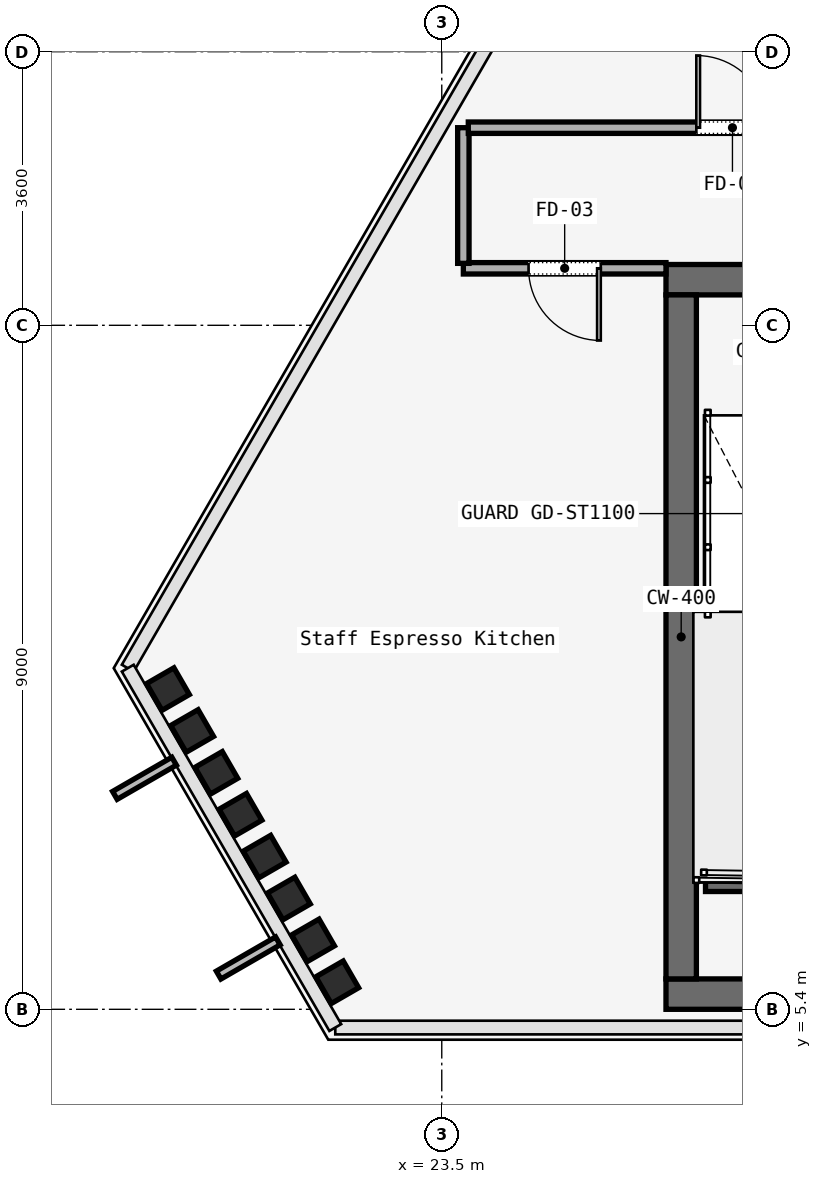
"""IFC4 building model, lengths in metres.
Left out: names, types, materials, properties, quantities, classifications, styles, units other than length and angle.
Written with IfcOpenShell. Run it as: python <this file> out.ifc"""

import sys

from ifc_helpers import new_model, si_unit, direction, frame, frame_2d, origin, origin_2d, place, context, subcontext, project, spatial, rectangle, i_section, extrude, element, fill, save


model = new_model("IFC4")
c1 = context("Model", 3, precision=1e-05, world=origin(), true_north=direction((0.0, 1.0)))
c2 = subcontext(c1, "Body", "Model", "MODEL_VIEW")
j1 = project(units=[si_unit("LENGTHUNIT", "METRE"), si_unit("PLANEANGLEUNIT", "RADIAN")], contexts=[c1])
p1 = place(None, origin())
s1 = spatial("IfcSite", under=j1, at=p1, CompositionType="ELEMENT")
p2 = place(p1, origin())
s2 = spatial("IfcBuilding", under=s1, at=p2, CompositionType="ELEMENT")
p3 = place(p2, frame((0.0, 0.0, 267.4)))
s3 = spatial("IfcBuildingStorey", under=s2, at=p3, CompositionType="ELEMENT", Elevation=267.4)
p4 = place(p3, frame((26.45, 15.0, 0.0), z_axis=(0.0, 0.0, 1.0), x_axis=(1.0, 0.0, 0.0)))
e1 = element("IfcWall", 1, at=p4, inside=s3, PredefinedType="SOLIDWALL", context=c2, shape_type="SweptSolid", body=[
    extrude(rectangle(XDim=31.1, YDim=0.4, at=frame_2d((15.55, 0.0))), origin(), (0.0, 0.0, 1.0), 3.58),
])
p5 = place(p4, frame((1.65, 0.0, 0.0)))
e2 = element("IfcOpeningElement", 2, at=p5, cuts=e1, PredefinedType="OPENING", context=c2, shape_type="SweptSolid", body=[
    extrude(rectangle(XDim=1.1, YDim=2.2, at=frame_2d((0.55, 1.1))), frame((0.0, 0.2, 0.0), z_axis=(0.0, -1.0, 0.0), x_axis=(1.0, 0.0, 0.0)), (0.0, 0.0, 1.0), 0.4),
])
p6 = place(p4, frame((13.65, 0.0, 0.0)))
e3 = element("IfcOpeningElement", 3, at=p6, cuts=e1, PredefinedType="OPENING", context=c2, shape_type="SweptSolid", body=[
    extrude(rectangle(XDim=1.1, YDim=2.2, at=frame_2d((0.55, 1.1))), frame((0.0, 0.2, 0.0), z_axis=(0.0, -1.0, 0.0), x_axis=(1.0, 0.0, 0.0)), (0.0, 0.0, 1.0), 0.4),
])
p7 = place(p4, frame((25.55, 0.0, 0.0)))
e4 = element("IfcOpeningElement", 4, at=p7, cuts=e1, PredefinedType="OPENING", context=c2, shape_type="SweptSolid", body=[
    extrude(rectangle(XDim=1.1, YDim=2.2, at=frame_2d((0.55, 1.1))), frame((0.0, 0.2, 0.0), z_axis=(0.0, -1.0, 0.0), x_axis=(1.0, 0.0, 0.0)), (0.0, 0.0, 1.0), 0.4),
])
p8 = place(p4, frame((19.35, 0.0, 0.0)))
e5 = element("IfcOpeningElement", 5, at=p8, cuts=e1, PredefinedType="OPENING", context=c2, shape_type="SweptSolid", body=[
    extrude(rectangle(XDim=1.1, YDim=2.2, at=frame_2d((0.55, 1.1))), frame((0.0, 0.2, 0.0), z_axis=(0.0, -1.0, 0.0), x_axis=(1.0, 0.0, 0.0)), (0.0, 0.0, 1.0), 0.4),
])
p9 = place(p4, frame((21.4, 0.0, 0.0)))
e6 = element("IfcOpeningElement", 6, at=p9, cuts=e1, PredefinedType="OPENING", context=c2, shape_type="SweptSolid", body=[
    extrude(rectangle(XDim=0.9, YDim=2.1, at=frame_2d((0.45, 1.05))), frame((0.0, 0.2, 0.0), z_axis=(0.0, -1.0, 0.0), x_axis=(1.0, 0.0, 0.0)), (0.0, 0.0, 1.0), 0.4),
])
p10 = place(p4, frame((6.54, 0.0, 0.0)))
e7 = element("IfcOpeningElement", 7, at=p10, cuts=e1, PredefinedType="OPENING", context=c2, shape_type="SweptSolid", body=[
    extrude(rectangle(XDim=0.95, YDim=2.2, at=frame_2d((0.475, 1.1))), frame((0.0, 0.2, 0.0), z_axis=(0.0, -1.0, 0.0), x_axis=(1.0, 0.0, 0.0)), (0.0, 0.0, 1.0), 0.4),
])
p11 = place(p4, frame((10.49, 0.0, 0.0)))
e8 = element("IfcOpeningElement", 8, at=p11, cuts=e1, PredefinedType="OPENING", context=c2, shape_type="SweptSolid", body=[
    extrude(rectangle(XDim=0.95, YDim=2.2, at=frame_2d((0.475, 1.1))), frame((0.0, 0.2, 0.0), z_axis=(0.0, -1.0, 0.0), x_axis=(1.0, 0.0, 0.0)), (0.0, 0.0, 1.0), 0.4),
])
p12 = place(p4, frame((23.35, 0.0, 0.0)))
e9 = element("IfcOpeningElement", 9, at=p12, cuts=e1, PredefinedType="OPENING", context=c2, shape_type="SweptSolid", body=[
    extrude(rectangle(XDim=1.3, YDim=2.3, at=frame_2d((0.65, 1.15))), frame((0.0, 0.2, 0.0), z_axis=(0.0, -1.0, 0.0), x_axis=(1.0, 0.0, 0.0)), (0.0, 0.0, 1.0), 0.4),
])
p13 = place(p3, frame((26.45, 5.6, 0.0), z_axis=(0.0, 0.0, 1.0), x_axis=(1.0, 0.0, 0.0)))
e10 = element("IfcWall", 10, at=p13, inside=s3, PredefinedType="SOLIDWALL", context=c2, shape_type="SweptSolid", body=[
    extrude(rectangle(XDim=31.1, YDim=0.4, at=frame_2d((15.55, 0.0))), origin(), (0.0, 0.0, 1.0), 3.58),
])
p14 = place(p3, frame((26.65, 5.8, 0.0), z_axis=(0.0, 0.0, 1.0), x_axis=(0.0, 1.0, 0.0)))
e11 = element("IfcWall", 11, at=p14, inside=s3, PredefinedType="SOLIDWALL", context=c2, shape_type="SweptSolid", body=[
    extrude(rectangle(XDim=9.0, YDim=0.4, at=frame_2d((4.5, 0.0))), origin(), (0.0, 0.0, 1.0), 3.58),
])
p15 = place(p3, frame((19.897, 9.613, 0.0), z_axis=(0.032193698933, -0.083744368744, 0.995967091049), x_axis=(-0.776202026322, 0.62567823134, 0.077699196653)))
e12 = element("IfcColumn", 12, at=p15, inside=s3, PredefinedType="COLUMN", context=c2, shape_type="SweptSolid", body=[
    extrude(i_section(OverallWidth=0.406, OverallDepth=0.416, WebThickness=0.03, FlangeThickness=0.037, FilletRadius=0.015, at=origin_2d()), origin(), (0.0, 0.0, 1.0), 3.594),
])
p16 = place(p3, frame((20.216, 9.062, 0.0), z_axis=(0.025768771988, -0.072614903648, 0.997027104024), x_axis=(-0.759977664998, 0.646514681444, 0.066728669859)))
e13 = element("IfcColumn", 13, at=p16, inside=s3, PredefinedType="COLUMN", context=c2, shape_type="SweptSolid", body=[
    extrude(i_section(OverallWidth=0.406, OverallDepth=0.416, WebThickness=0.03, FlangeThickness=0.037, FilletRadius=0.015, at=origin_2d()), origin(), (0.0, 0.0, 1.0), 3.591),
])
p17 = place(p3, frame((20.534, 8.511, 0.0), z_axis=(0.01932684997, -0.061519268919, 0.997918760432), x_axis=(-0.736036278953, 0.674634705142, 0.055844522413)))
e14 = element("IfcColumn", 14, at=p17, inside=s3, PredefinedType="COLUMN", context=c2, shape_type="SweptSolid", body=[
    extrude(i_section(OverallWidth=0.406, OverallDepth=0.416, WebThickness=0.03, FlangeThickness=0.037, FilletRadius=0.015, at=origin_2d()), origin(), (0.0, 0.0, 1.0), 3.588),
])
p18 = place(p3, frame((20.852, 7.96, 0.0), z_axis=(0.012939351426, -0.050395368712, 0.998645522694), x_axis=(-0.699371889623, 0.71333626012, 0.045059294293)))
e15 = element("IfcColumn", 15, at=p18, inside=s3, PredefinedType="COLUMN", context=c2, shape_type="SweptSolid", body=[
    extrude(i_section(OverallWidth=0.406, OverallDepth=0.416, WebThickness=0.03, FlangeThickness=0.037, FilletRadius=0.015, at=origin_2d()), origin(), (0.0, 0.0, 1.0), 3.585),
])
p19 = place(p3, frame((21.17, 7.409, 0.0), z_axis=(0.006405185512, -0.03924879633, 0.999208939905), x_axis=(-0.632846982023, 0.773510553601, 0.034440104691)))
e16 = element("IfcColumn", 16, at=p19, inside=s3, PredefinedType="COLUMN", context=c2, shape_type="SweptSolid", body=[
    extrude(i_section(OverallWidth=0.406, OverallDepth=0.416, WebThickness=0.03, FlangeThickness=0.037, FilletRadius=0.015, at=origin_2d()), origin(), (0.0, 0.0, 1.0), 3.583),
])
p20 = place(p3, frame((21.488, 6.858, 0.0), z_axis=(-6.8167317e-05, -0.028084934649, 0.999605538099), x_axis=(-0.497897359143, 0.866894828458, 0.024322338514)))
e17 = element("IfcColumn", 17, at=p20, inside=s3, PredefinedType="COLUMN", context=c2, shape_type="SweptSolid", body=[
    extrude(i_section(OverallWidth=0.406, OverallDepth=0.416, WebThickness=0.03, FlangeThickness=0.037, FilletRadius=0.015, at=origin_2d()), origin(), (0.0, 0.0, 1.0), 3.582),
])
p21 = place(p3, frame((21.806, 6.307, 0.0), z_axis=(-0.006477395903, -0.016841229347, 0.999837194915), x_axis=(-0.155838414652, 0.987658949623, 0.015626507854)))
e18 = element("IfcColumn", 18, at=p21, inside=s3, PredefinedType="COLUMN", context=c2, shape_type="SweptSolid", body=[
    extrude(i_section(OverallWidth=0.406, OverallDepth=0.416, WebThickness=0.03, FlangeThickness=0.037, FilletRadius=0.015, at=origin_2d()), origin(), (0.0, 0.0, 1.0), 3.581),
])
p22 = place(p3, frame((22.125, 5.756, 0.0), z_axis=(-0.012955611258, -0.005591369069, 0.999900439408), x_axis=(0.596929933776, 0.802200299619, 0.012220206764)))
e19 = element("IfcColumn", 19, at=p22, inside=s3, PredefinedType="COLUMN", context=c2, shape_type="SweptSolid", body=[
    extrude(i_section(OverallWidth=0.406, OverallDepth=0.416, WebThickness=0.03, FlangeThickness=0.037, FilletRadius=0.015, at=origin_2d()), origin(), (0.0, 0.0, 1.0), 3.58),
])
p23 = place(p3, frame((26.97, 7.05, 0.0), z_axis=(0.0, 0.0, 1.0), x_axis=(1.0, 0.0, 0.0)))
e20 = element("IfcWall", 20, at=p23, inside=s3, PredefinedType="SOLIDWALL", context=c2, shape_type="SweptSolid", body=[
    extrude(rectangle(XDim=3.115, YDim=0.2, at=frame_2d((1.558, 0.0))), origin(), (0.0, 0.0, 1.0), 3.8),
])
p24 = place(p3, frame((26.45, 15.15, 0.0), z_axis=(0.0, 0.0, 1.0), x_axis=(-1.0, 0.0, 0.0)))
e21 = element("IfcWall", 21, at=p24, inside=s3, PredefinedType="PARTITIONING", context=c2, shape_type="SweptSolid", body=[
    extrude(rectangle(XDim=2.666, YDim=0.15, at=frame_2d((1.333, 0.0))), origin(), (0.0, 0.0, 1.0), 3.01),
])
p25 = place(p24, frame((0.858, 0.0, 0.0)))
e22 = element("IfcOpeningElement", 22, at=p25, cuts=e21, PredefinedType="OPENING", context=c2, shape_type="SweptSolid", body=[
    extrude(rectangle(XDim=0.95, YDim=2.2, at=frame_2d((0.475, 1.1))), frame((0.0, 0.075, 0.0), z_axis=(0.0, -1.0, 0.0), x_axis=(1.0, 0.0, 0.0)), (0.0, 0.0, 1.0), 0.15),
])
p26 = place(p3, frame((23.784, 15.215, 0.0), z_axis=(0.0, 0.0, 1.0), x_axis=(0.0, 1.0, 0.0)))
e23 = element("IfcWall", 23, at=p26, inside=s3, PredefinedType="PARTITIONING", context=c2, shape_type="SweptSolid", body=[
    extrude(rectangle(XDim=1.785, YDim=0.15, at=frame_2d((0.893, 0.0))), origin(), (0.0, 0.0, 1.0), 3.01),
])
p27 = place(p3, frame((23.849, 17.0, 0.0), z_axis=(0.0, 0.0, 1.0), x_axis=(1.0, 0.0, 0.0)))
e24 = element("IfcWall", 24, at=p27, inside=s3, PredefinedType="PARTITIONING", context=c2, shape_type="SweptSolid", body=[
    extrude(rectangle(XDim=6.951, YDim=0.15, at=frame_2d((3.476, 0.0))), origin(), (0.0, 0.0, 1.0), 3.01),
])
p28 = place(p27, frame((3.0, 0.0, 0.0)))
e25 = element("IfcOpeningElement", 25, at=p28, cuts=e24, PredefinedType="OPENING", context=c2, shape_type="SweptSolid", body=[
    extrude(rectangle(XDim=0.95, YDim=2.2, at=frame_2d((0.475, 1.1))), frame((0.0, 0.075, 0.0), z_axis=(0.0, -1.0, 0.0), x_axis=(1.0, 0.0, 0.0)), (0.0, 0.0, 1.0), 0.15),
])
p29 = place(p25, origin())
e26 = element("IfcDoor", 26, at=p29, inside=s3, OperationType="SINGLE_SWING_LEFT", PredefinedType="DOOR", context=c2, shape_type="SweptSolid", body=[
    extrude(rectangle(XDim=0.95, YDim=2.2, at=frame_2d((0.475, 1.1))), frame((0.0, 0.025, 0.0), z_axis=(0.0, -1.0, 0.0), x_axis=(1.0, 0.0, 0.0)), (0.0, 0.0, 1.0), 0.05),
])
fill(e22, e26)
p30 = place(p28, origin())
e27 = element("IfcDoor", 27, at=p30, inside=s3, OperationType="SINGLE_SWING_RIGHT", PredefinedType="DOOR", context=c2, shape_type="SweptSolid", body=[
    extrude(rectangle(XDim=0.95, YDim=2.2, at=frame_2d((0.475, 1.1))), frame((0.0, 0.025, 0.0), z_axis=(0.0, -1.0, 0.0), x_axis=(1.0, 0.0, 0.0)), (0.0, 0.0, 1.0), 0.05),
])
fill(e25, e27)
save(model, sys.argv[1])
